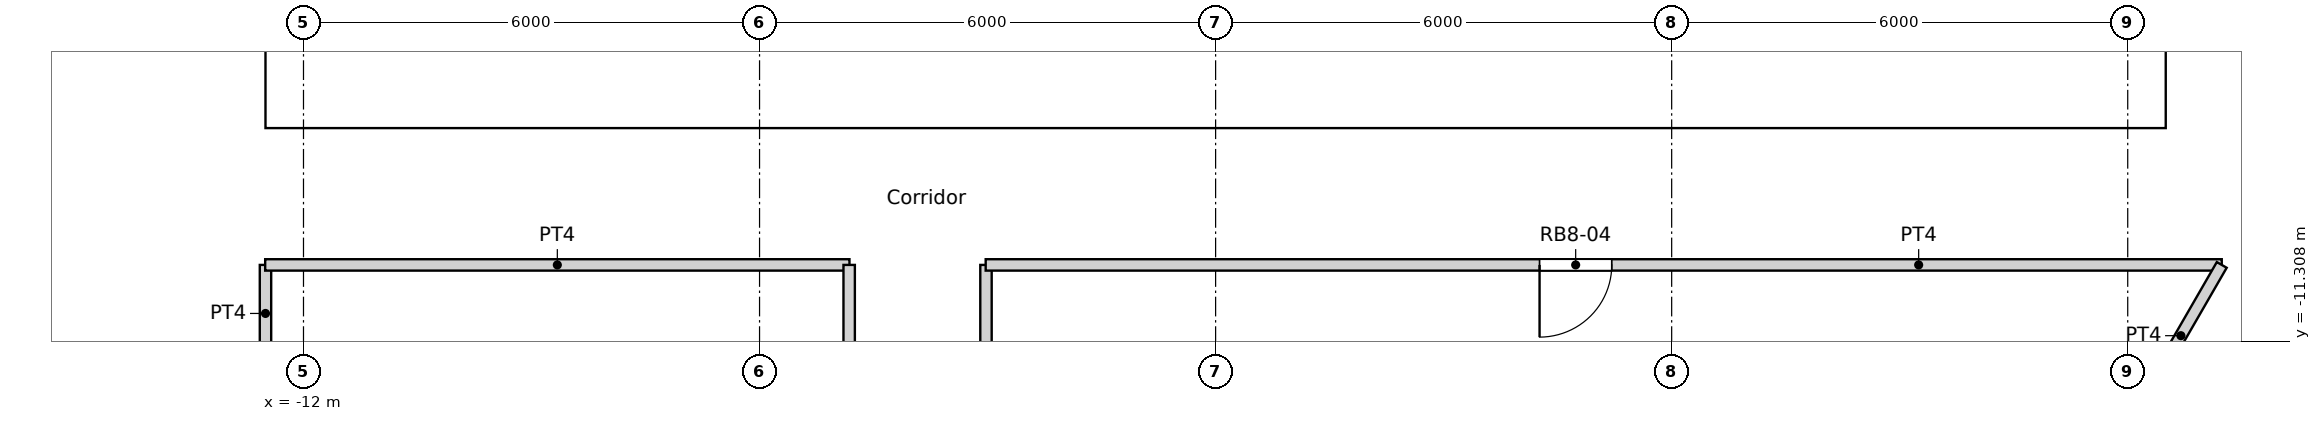
"""IFC4 building model, lengths in metres.
Left out: names, types, materials, properties, quantities, classifications, styles, units other than length and angle.
Written with IfcOpenShell. Run it as: python <this file> out.ifc"""

import sys

from ifc_helpers import new_model, si_unit, direction, frame, frame_2d, origin, place, context, subcontext, project, spatial, rectangle, extrude, element, fill, save


model = new_model("IFC4")
c1 = context("Model", 3, precision=1e-05, world=origin(), true_north=direction((0.0, 1.0)))
c2 = subcontext(c1, "Body", "Model", "MODEL_VIEW")
j1 = project(units=[si_unit("LENGTHUNIT", "METRE"), si_unit("PLANEANGLEUNIT", "RADIAN")], contexts=[c1])
p1 = place(None, origin())
s1 = spatial("IfcSite", under=j1, at=p1, CompositionType="ELEMENT")
p2 = place(p1, origin())
s2 = spatial("IfcBuilding", under=s1, at=p2, CompositionType="ELEMENT")
p3 = place(p2, frame((0.0, 0.0, 201.6)))
s3 = spatial("IfcBuildingStorey", under=s2, at=p3, CompositionType="ELEMENT", Elevation=201.6)
p4 = place(p3, frame((-12.5, -8.05, 0.0), z_axis=(0.0, 0.0, 1.0), x_axis=(1.0, 0.0, 0.0)))
e1 = element("IfcWall", 1, at=p4, inside=s3, PredefinedType="SOLIDWALL", context=c2, shape_type="SweptSolid", body=[
    extrude(rectangle(XDim=25.0, YDim=0.9, at=frame_2d((12.5, 0.0))), origin(), (0.0, 0.0, 1.0), 3.6),
])
p5 = place(p4, frame((13.4, 0.0, 0.0)))
e2 = element("IfcOpeningElement", 2, at=p5, cuts=e1, PredefinedType="OPENING", context=c2, shape_type="SweptSolid", body=[
    extrude(rectangle(XDim=1.0, YDim=2.1, at=frame_2d((0.5, 1.05))), frame((0.0, 0.45, 0.0), z_axis=(0.0, -1.0, 0.0), x_axis=(1.0, 0.0, 0.0)), (0.0, 0.0, 1.0), 0.9),
])
p6 = place(p4, frame((8.3, 0.0, 0.0)))
e3 = element("IfcOpeningElement", 3, at=p6, cuts=e1, PredefinedType="OPENING", context=c2, shape_type="SweptSolid", body=[
    extrude(rectangle(XDim=1.8, YDim=2.1, at=frame_2d((0.9, 1.05))), frame((0.0, 0.45, 0.0), z_axis=(0.0, -1.0, 0.0), x_axis=(1.0, 0.0, 0.0)), (0.0, 0.0, 1.0), 0.9),
])
p7 = place(p4, frame((14.9, 0.0, 0.0)))
e4 = element("IfcOpeningElement", 4, at=p7, cuts=e1, PredefinedType="OPENING", context=c2, shape_type="SweptSolid", body=[
    extrude(rectangle(XDim=1.8, YDim=2.1, at=frame_2d((0.9, 1.05))), frame((0.0, 0.45, 0.0), z_axis=(0.0, -1.0, 0.0), x_axis=(1.0, 0.0, 0.0)), (0.0, 0.0, 1.0), 0.9),
])
p8 = place(p3, frame((-12.05, -7.6, 0.0), z_axis=(0.0, 0.0, 1.0), x_axis=(0.0, 1.0, 0.0)))
e5 = element("IfcWall", 5, at=p8, inside=s3, PredefinedType="SOLIDWALL", context=c2, shape_type="SweptSolid", body=[
    extrude(rectangle(XDim=15.2, YDim=0.9, at=frame_2d((7.6, 0.0))), origin(), (0.0, 0.0, 1.0), 3.6),
])
p9 = place(p8, frame((7.1, 0.0, 0.0)))
e6 = element("IfcOpeningElement", 6, at=p9, cuts=e5, PredefinedType="OPENING", context=c2, shape_type="SweptSolid", body=[
    extrude(rectangle(XDim=1.0, YDim=2.1, at=frame_2d((0.5, 1.05))), frame((0.0, 0.45, 0.0), z_axis=(0.0, -1.0, 0.0), x_axis=(1.0, 0.0, 0.0)), (0.0, 0.0, 1.0), 0.9),
])
p10 = place(p3, frame((12.05, -7.6, 0.0), z_axis=(0.0, 0.0, 1.0), x_axis=(0.0, 1.0, 0.0)))
e7 = element("IfcWall", 7, at=p10, inside=s3, PredefinedType="SOLIDWALL", context=c2, shape_type="SweptSolid", body=[
    extrude(rectangle(XDim=15.2, YDim=0.9, at=frame_2d((7.6, 0.0))), origin(), (0.0, 0.0, 1.0), 3.6),
])
p11 = place(p10, frame((5.1, 0.0, 0.0)))
e8 = element("IfcOpeningElement", 8, at=p11, cuts=e7, PredefinedType="OPENING", context=c2, shape_type="SweptSolid", body=[
    extrude(rectangle(XDim=1.0, YDim=2.1, at=frame_2d((0.5, 1.05))), frame((0.0, 0.45, 0.0), z_axis=(0.0, -1.0, 0.0), x_axis=(1.0, 0.0, 0.0)), (0.0, 0.0, 1.0), 0.9),
])
for number, where, z_axis, x_axis in (
    (9, (0.55, -7.6, 0.0), (0.0, 0.0, 1.0), (0.0, 1.0, 0.0)),
    (10, (2.25, -7.6, 0.0), (0.0, 0.0, 1.0), (0.0, 1.0, 0.0)),
):
    element("IfcWall", number, at=place(p3, frame(where, z_axis=z_axis, x_axis=x_axis)), inside=s3, PredefinedType="SOLIDWALL", context=c2, shape_type="SweptSolid", body=[
        extrude(rectangle(XDim=4.35, YDim=0.3, at=frame_2d((2.175, 0.0))), origin(), (0.0, 0.0, 1.0), 3.3),
    ])
p12 = place(p3, frame((-9.05, -7.15, 0.0), z_axis=(0.0, 0.0, 1.0), x_axis=(1.0, 0.0, 0.0)))
e11 = element("IfcWall", 11, at=p12, inside=s3, PredefinedType="SOLIDWALL", context=c2, shape_type="SweptSolid", body=[
    extrude(rectangle(XDim=4.85, YDim=0.9, at=frame_2d((2.425, 0.0))), origin(), (0.0, 0.0, 1.0), 3.3),
])
p13 = place(p3, frame((-2.4, -7.15, 0.0), z_axis=(0.0, 0.0, 1.0), x_axis=(1.0, 0.0, 0.0)))
e12 = element("IfcWall", 12, at=p13, inside=s3, PredefinedType="SOLIDWALL", context=c2, shape_type="SweptSolid", body=[
    extrude(rectangle(XDim=2.8, YDim=0.9, at=frame_2d((1.4, 0.0))), origin(), (0.0, 0.0, 1.0), 3.3),
])
p14 = place(p3, frame((4.2, -7.15, 0.0), z_axis=(0.0, 0.0, 1.0), x_axis=(1.0, 0.0, 0.0)))
e13 = element("IfcWall", 13, at=p14, inside=s3, PredefinedType="SOLIDWALL", context=c2, shape_type="SweptSolid", body=[
    extrude(rectangle(XDim=4.85, YDim=0.9, at=frame_2d((2.425, 0.0))), origin(), (0.0, 0.0, 1.0), 3.3),
])
p15 = place(p3, frame((-12.504, -10.3, 0.0), z_axis=(0.0, 0.0, 1.0), x_axis=(1.0, 0.0, 0.0)))
e14 = element("IfcWall", 14, at=p15, inside=s3, PredefinedType="PARTITIONING", context=c2, shape_type="SweptSolid", body=[
    extrude(rectangle(XDim=7.687, YDim=0.15, at=frame_2d((3.844, 0.0))), origin(), (0.0, 0.0, 1.0), 3.3),
])
p16 = place(p3, frame((-3.025, -10.3, 0.0), z_axis=(0.0, 0.0, 1.0), x_axis=(1.0, 0.0, 0.0)))
e15 = element("IfcWall", 15, at=p16, inside=s3, PredefinedType="PARTITIONING", context=c2, shape_type="SweptSolid", body=[
    extrude(rectangle(XDim=16.262, YDim=0.15, at=frame_2d((8.131, 0.0))), origin(), (0.0, 0.0, 1.0), 3.3),
])
p17 = place(p16, frame((7.287, 0.0, 0.0)))
e16 = element("IfcOpeningElement", 16, at=p17, cuts=e15, PredefinedType="OPENING", context=c2, shape_type="SweptSolid", body=[
    extrude(rectangle(XDim=0.95, YDim=2.1, at=frame_2d((0.475, 1.05))), frame((0.0, 0.075, 0.0), z_axis=(0.0, -1.0, 0.0), x_axis=(1.0, 0.0, 0.0)), (0.0, 0.0, 1.0), 0.15),
])
p18 = place(p3, frame((12.162, -12.162, 0.0), z_axis=(0.0, 0.0, 1.0), x_axis=(0.499961633463, 0.866047553582, 0.0)))
e17 = element("IfcWall", 17, at=p18, inside=s3, PredefinedType="PARTITIONING", context=c2, shape_type="SweptSolid", body=[
    extrude(rectangle(XDim=2.15, YDim=0.15, at=frame_2d((1.075, 0.0))), origin(), (0.0, 0.0, 1.0), 3.3),
])
p19 = place(p3, frame((-12.5, -11.577, 0.0), z_axis=(0.0, 0.0, 1.0), x_axis=(0.0, 1.0, 0.0)))
e18 = element("IfcWall", 18, at=p19, inside=s3, PredefinedType="PARTITIONING", context=c2, shape_type="SweptSolid", body=[
    extrude(rectangle(XDim=1.277, YDim=0.15, at=frame_2d((0.638, 0.0))), origin(), (0.0, 0.0, 1.0), 3.3),
])
p20 = place(p3, frame((-18.688, -6.802, 0.0), z_axis=(0.0, 0.0, 1.0), x_axis=(0.500009041241, -0.866020183759, 0.0)))
e19 = element("IfcWall", 19, at=p20, inside=s3, PredefinedType="PARTITIONING", context=c2, shape_type="SweptSolid", body=[
    extrude(rectangle(XDim=6.907, YDim=0.15, at=frame_2d((3.454, 0.0))), origin(), (0.0, 0.0, 1.0), 3.3),
])
p21 = place(p20, frame((3.04, 0.0, 0.0)))
e20 = element("IfcOpeningElement", 20, at=p21, cuts=e19, PredefinedType="OPENING", context=c2, shape_type="SweptSolid", body=[
    extrude(rectangle(XDim=1.0, YDim=2.1, at=frame_2d((0.5, 1.05))), frame((0.0, 0.075, 0.0), z_axis=(0.0, -1.0, 0.0), x_axis=(1.0, 0.0, 0.0)), (0.0, 0.0, 1.0), 0.15),
])
p22 = place(p20, frame((5.249, 0.0, 0.0)))
e21 = element("IfcOpeningElement", 21, at=p22, cuts=e19, PredefinedType="OPENING", context=c2, shape_type="SweptSolid", body=[
    extrude(rectangle(XDim=1.0, YDim=2.1, at=frame_2d((0.5, 1.05))), frame((0.0, 0.075, 0.0), z_axis=(0.0, -1.0, 0.0), x_axis=(1.0, 0.0, 0.0)), (0.0, 0.0, 1.0), 0.15),
])
p23 = place(p3, frame((-4.821, -16.401, 0.0), z_axis=(0.0, 0.0, 1.0), x_axis=(0.0, 1.0, 0.0)))
e22 = element("IfcWall", 22, at=p23, inside=s3, PredefinedType="PARTITIONING", context=c2, shape_type="SweptSolid", body=[
    extrude(rectangle(XDim=6.101, YDim=0.15, at=frame_2d((3.05, 0.0))), origin(), (0.0, 0.0, 1.0), 3.3),
])
p24 = place(p3, frame((-3.021, -16.614, 0.0), z_axis=(0.0, 0.0, 1.0), x_axis=(0.0, 1.0, 0.0)))
e23 = element("IfcWall", 23, at=p24, inside=s3, PredefinedType="PARTITIONING", context=c2, shape_type="SweptSolid", body=[
    extrude(rectangle(XDim=6.314, YDim=0.15, at=frame_2d((3.157, 0.0))), origin(), (0.0, 0.0, 1.0), 3.3),
])
p25 = place(p5, origin())
e24 = element("IfcDoor", 24, at=p25, inside=s3, OperationType="SINGLE_SWING_LEFT", PredefinedType="DOOR", context=c2, shape_type="SweptSolid", body=[
    extrude(rectangle(XDim=1.0, YDim=2.1, at=frame_2d((0.5, 1.05))), frame((0.0, 0.025, 0.0), z_axis=(0.0, -1.0, 0.0), x_axis=(1.0, 0.0, 0.0)), (0.0, 0.0, 1.0), 0.05),
])
fill(e2, e24)
p26 = place(p6, origin())
e25 = element("IfcDoor", 25, at=p26, inside=s3, OperationType="DOUBLE_DOOR_SINGLE_SWING", PredefinedType="DOOR", context=c2, shape_type="SweptSolid", body=[
    extrude(rectangle(XDim=1.8, YDim=2.1, at=frame_2d((0.9, 1.05))), frame((0.0, 0.025, 0.0), z_axis=(0.0, -1.0, 0.0), x_axis=(1.0, 0.0, 0.0)), (0.0, 0.0, 1.0), 0.05),
])
fill(e3, e25)
p27 = place(p7, origin())
e26 = element("IfcDoor", 26, at=p27, inside=s3, OperationType="DOUBLE_DOOR_SINGLE_SWING", PredefinedType="DOOR", context=c2, shape_type="SweptSolid", body=[
    extrude(rectangle(XDim=1.8, YDim=2.1, at=frame_2d((0.9, 1.05))), frame((0.0, 0.025, 0.0), z_axis=(0.0, -1.0, 0.0), x_axis=(1.0, 0.0, 0.0)), (0.0, 0.0, 1.0), 0.05),
])
fill(e4, e26)
p28 = place(p17, origin())
e27 = element("IfcDoor", 27, at=p28, inside=s3, OperationType="SINGLE_SWING_RIGHT", PredefinedType="DOOR", context=c2, shape_type="SweptSolid", body=[
    extrude(rectangle(XDim=0.95, YDim=2.1, at=frame_2d((0.475, 1.05))), frame((0.0, 0.025, 0.0), z_axis=(0.0, -1.0, 0.0), x_axis=(1.0, 0.0, 0.0)), (0.0, 0.0, 1.0), 0.05),
])
fill(e16, e27)
save(model, sys.argv[1])
